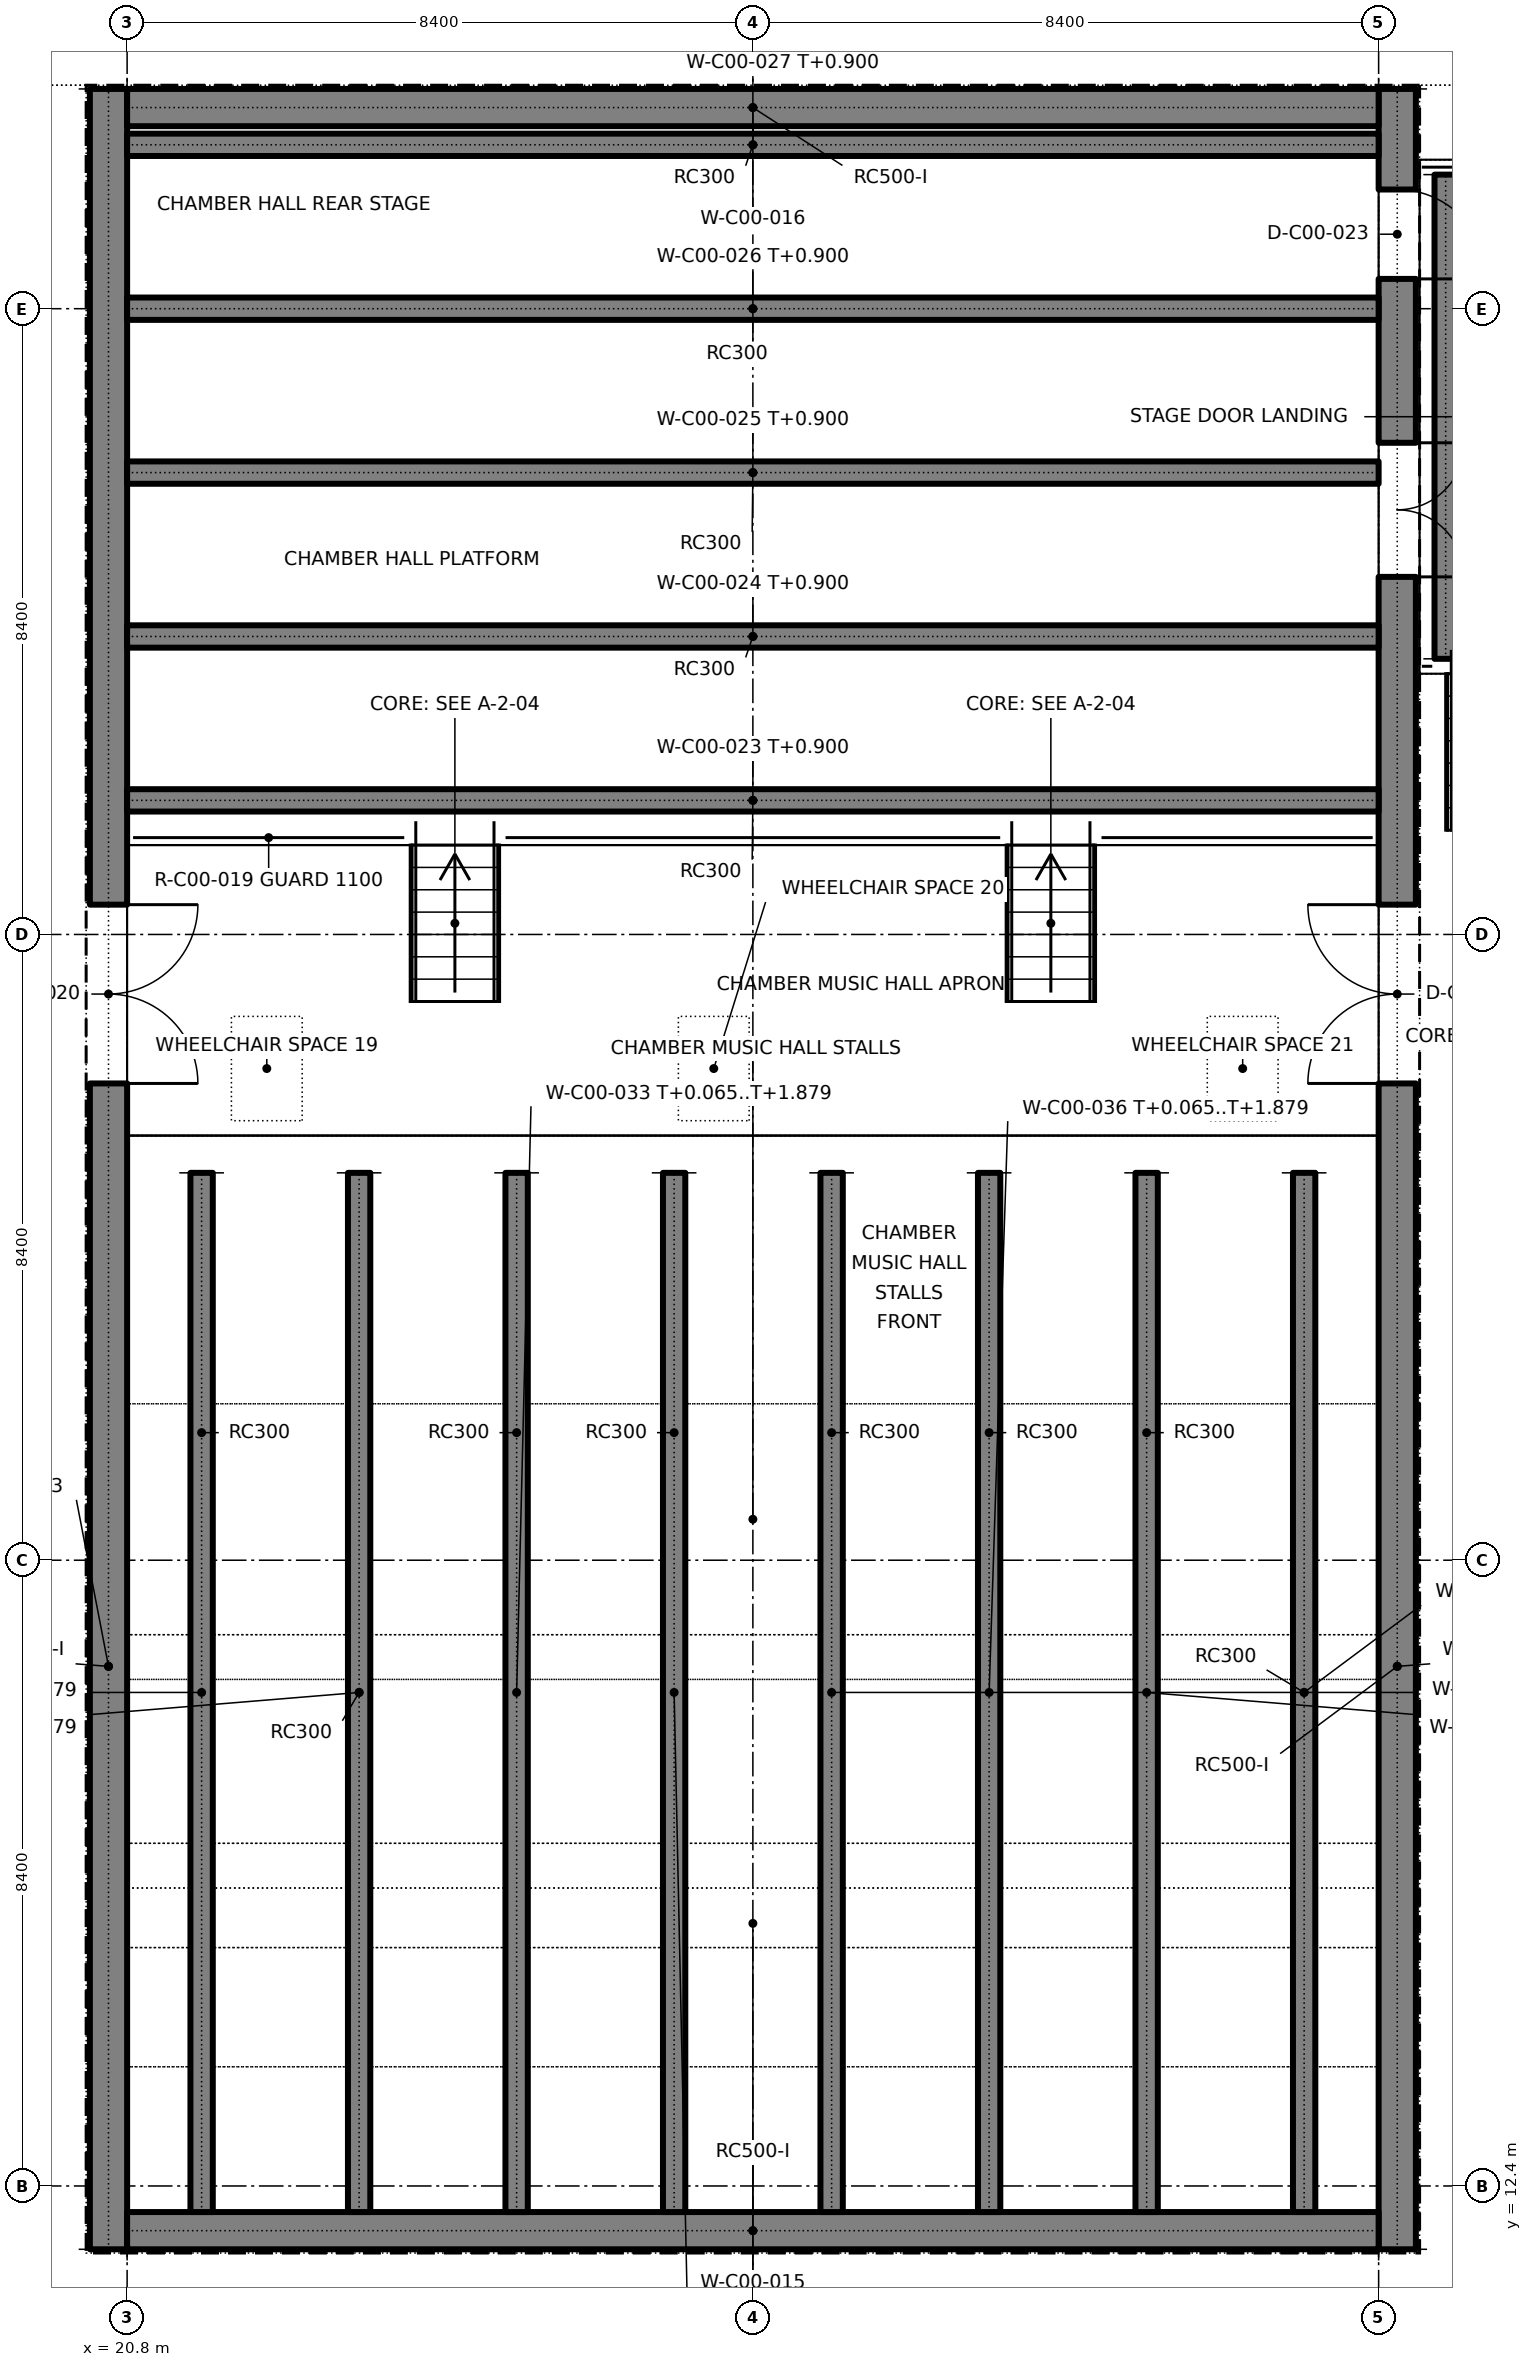
"""IFC4 building model, lengths in metres.
Left out: names, types, materials, properties, quantities, classifications, styles, units other than length and angle.
Written with IfcOpenShell. Run it as: python <this file> out.ifc"""

import sys

from ifc_helpers import new_model, si_unit, direction, frame, frame_2d, origin, place, context, subcontext, project, spatial, polyline, rectangle, outline, extrude, element, fill, save


model = new_model("IFC4")
c1 = context("Model", 3, precision=1e-05, world=origin(), true_north=direction((0.0, 1.0)))
c2 = subcontext(c1, "Body", "Model", "MODEL_VIEW")
j1 = project(units=[si_unit("LENGTHUNIT", "METRE"), si_unit("PLANEANGLEUNIT", "RADIAN")], contexts=[c1])
p1 = place(None, origin())
s1 = spatial("IfcSite", under=j1, at=p1, CompositionType="ELEMENT")
p2 = place(p1, origin())
s2 = spatial("IfcBuilding", under=s1, at=p2, CompositionType="ELEMENT")
p3 = place(p2, origin())
s3 = spatial("IfcBuildingStorey", under=s2, at=p3, CompositionType="ELEMENT", Elevation=0.0)
p4 = place(p3, frame((20.55, 11.55, 0.0), z_axis=(0.0, 0.0, 1.0), x_axis=(0.0, 1.0, 0.0)))
e1 = element("IfcWall", 1, at=p4, inside=s3, PredefinedType="SOLIDWALL", context=c2, shape_type="SweptSolid", body=[
    extrude(rectangle(XDim=29.0, YDim=0.5, at=frame_2d((14.5, 0.0))), origin(), (0.0, 0.0, 1.0), 5.4),
])
p5 = place(p4, frame((15.65, 0.0, 0.0)))
e2 = element("IfcOpeningElement", 2, at=p5, cuts=e1, PredefinedType="OPENING", context=c2, shape_type="SweptSolid", body=[
    extrude(rectangle(XDim=2.4, YDim=2.1, at=frame_2d((1.2, 1.05))), frame((0.0, 0.26, 0.0), z_axis=(0.0, -1.0, 0.0), x_axis=(1.0, 0.0, 0.0)), (0.0, 0.0, 1.0), 0.52),
])
p6 = place(p3, frame((37.85, 11.55, 0.0), z_axis=(0.0, 0.0, 1.0), x_axis=(0.0, 1.0, 0.0)))
e3 = element("IfcWall", 3, at=p6, inside=s3, PredefinedType="SOLIDWALL", context=c2, shape_type="SweptSolid", body=[
    extrude(rectangle(XDim=29.0, YDim=0.5, at=frame_2d((14.5, 0.0))), origin(), (0.0, 0.0, 1.0), 5.4),
])
p7 = place(p6, frame((15.65, 0.0, 0.0)))
e4 = element("IfcOpeningElement", 4, at=p7, cuts=e3, PredefinedType="OPENING", context=c2, shape_type="SweptSolid", body=[
    extrude(rectangle(XDim=2.4, YDim=2.1, at=frame_2d((1.2, 1.05))), frame((0.0, 0.26, 0.0), z_axis=(0.0, -1.0, 0.0), x_axis=(1.0, 0.0, 0.0)), (0.0, 0.0, 1.0), 0.52),
])
p8 = place(p6, frame((22.45, 0.0, 1.2)))
e5 = element("IfcOpeningElement", 5, at=p8, cuts=e3, PredefinedType="OPENING", context=c2, shape_type="SweptSolid", body=[
    extrude(rectangle(XDim=1.8, YDim=2.1, at=frame_2d((0.9, 1.05))), frame((0.0, 0.26, 0.0), z_axis=(0.0, -1.0, 0.0), x_axis=(1.0, 0.0, 0.0)), (0.0, 0.0, 1.0), 0.52),
])
p9 = place(p6, frame((26.45, 0.0, 1.2)))
e6 = element("IfcOpeningElement", 6, at=p9, cuts=e3, PredefinedType="OPENING", context=c2, shape_type="SweptSolid", body=[
    extrude(rectangle(XDim=1.2, YDim=2.1, at=frame_2d((0.6, 1.05))), frame((0.0, 0.26, 0.0), z_axis=(0.0, -1.0, 0.0), x_axis=(1.0, 0.0, 0.0)), (0.0, 0.0, 1.0), 0.52),
])
for number, where, z_axis, x_axis in (
    (7, (20.8, 11.8, 0.0), (0.0, 0.0, 1.0), (1.0, 0.0, 0.0)),
    (8, (20.8, 40.3, 0.0), (0.0, 0.0, 1.0), (1.0, 0.0, 0.0)),
):
    element("IfcWall", number, at=place(p3, frame(where, z_axis=z_axis, x_axis=x_axis)), inside=s3, PredefinedType="SOLIDWALL", context=c2, shape_type="SweptSolid", body=[
        extrude(rectangle(XDim=16.8, YDim=0.5, at=frame_2d((8.4, 0.0))), origin(), (0.0, 0.0, 1.0), 5.4),
    ])
for number, where, z_axis, x_axis in (
    (9, (20.8, 31.0, 0.0), (0.0, 0.0, 1.0), (1.0, 0.0, 0.0)),
    (10, (20.8, 33.2, 0.0), (0.0, 0.0, 1.0), (1.0, 0.0, 0.0)),
    (11, (20.8, 35.4, 0.0), (0.0, 0.0, 1.0), (1.0, 0.0, 0.0)),
    (12, (20.8, 37.6, 0.0), (0.0, 0.0, 1.0), (1.0, 0.0, 0.0)),
    (13, (20.8, 39.8, 0.0), (0.0, 0.0, 1.0), (1.0, 0.0, 0.0)),
):
    element("IfcWall", number, at=place(p3, frame(where, z_axis=z_axis, x_axis=x_axis)), inside=s3, PredefinedType="SOLIDWALL", context=c2, shape_type="SweptSolid", body=[
        extrude(rectangle(XDim=16.8, YDim=0.3, at=frame_2d((8.4, 0.0))), origin(), (0.0, 0.0, 1.0), 0.9),
    ])
p10 = place(p3, frame((38.5, 32.9, 0.0), z_axis=(0.0, 0.0, 1.0), x_axis=(0.0, 1.0, 0.0)))
e14 = element("IfcWall", 14, at=p10, inside=s3, PredefinedType="SOLIDWALL", context=c2, shape_type="SweptSolid", body=[
    extrude(rectangle(XDim=6.5, YDim=0.3, at=frame_2d((3.25, 0.0))), origin(), (0.0, 0.0, 1.0), 0.9),
])
for number, where, z_axis, x_axis in (
    (15, (21.8, 12.05, 0.0), (0.0, 0.0, 1.0), (0.0, 1.0, 0.0)),
    (16, (23.914, 12.05, 0.0), (0.0, 0.0, 1.0), (0.0, 1.0, 0.0)),
    (17, (26.029, 12.05, 0.0), (0.0, 0.0, 1.0), (0.0, 1.0, 0.0)),
    (18, (28.143, 12.05, 0.0), (0.0, 0.0, 1.0), (0.0, 1.0, 0.0)),
    (19, (30.257, 12.05, 0.0), (0.0, 0.0, 1.0), (0.0, 1.0, 0.0)),
    (20, (32.371, 12.05, 0.0), (0.0, 0.0, 1.0), (0.0, 1.0, 0.0)),
    (21, (34.486, 12.05, 0.0), (0.0, 0.0, 1.0), (0.0, 1.0, 0.0)),
    (22, (36.6, 12.05, 0.0), (0.0, 0.0, 1.0), (0.0, 1.0, 0.0)),
):
    element("IfcWall", number, at=place(p3, frame(where, z_axis=z_axis, x_axis=x_axis)), inside=s3, PredefinedType="SOLIDWALL", context=c2, shape_type="SweptSolid", body=[
        extrude(outline(polyline([(0.0, 0.0), (13.95, 0.0), (13.95, 0.065), (0.0, 1.878), (0.0, 0.0)])), frame((0.0, 0.15, 0.0), z_axis=(0.0, -1.0, 0.0), x_axis=(1.0, 0.0, 0.0)), (0.0, 0.0, 1.0), 0.3),
    ])
for number, where, z_axis, x_axis in (
    (23, (20.55, 11.57, -0.41), (0.0, 0.0, 1.0), (0.0, 1.0, 0.0)),
    (24, (37.85, 11.57, -0.41), (0.0, 0.0, 1.0), (0.0, 1.0, 0.0)),
):
    element("IfcWall", number, at=place(p3, frame(where, z_axis=z_axis, x_axis=x_axis)), inside=s3, PredefinedType="SOLIDWALL", context=c2, shape_type="SweptSolid", body=[
        extrude(rectangle(XDim=28.96, YDim=0.5, at=frame_2d((14.48, 0.0))), origin(), (0.0, 0.0, 1.0), 0.41),
    ])
p11 = place(p3, frame((20.8, 11.8, -0.41), z_axis=(0.0, 0.0, 1.0), x_axis=(1.0, 0.0, 0.0)))
e25 = element("IfcWall", 25, at=p11, inside=s3, PredefinedType="SOLIDWALL", context=c2, shape_type="SweptSolid", body=[
    extrude(rectangle(XDim=16.8, YDim=0.5, at=frame_2d((8.4, 0.0))), origin(), (0.0, 0.0, 1.0), 0.41),
])
p12 = place(p3, frame((20.8, 40.3, -0.3), z_axis=(0.0, 0.0, 1.0), x_axis=(1.0, 0.0, 0.0)))
e26 = element("IfcWall", 26, at=p12, inside=s3, PredefinedType="SOLIDWALL", context=c2, shape_type="SweptSolid", body=[
    extrude(rectangle(XDim=16.8, YDim=0.5, at=frame_2d((8.4, 0.0))), origin(), (0.0, 0.0, 1.0), 0.3),
])
p13 = place(p3, frame((20.8, 31.0, -0.41), z_axis=(0.0, 0.0, 1.0), x_axis=(1.0, 0.0, 0.0)))
e27 = element("IfcWall", 27, at=p13, inside=s3, PredefinedType="SOLIDWALL", context=c2, shape_type="SweptSolid", body=[
    extrude(rectangle(XDim=16.8, YDim=0.3, at=frame_2d((8.4, 0.0))), origin(), (0.0, 0.0, 1.0), 0.41),
])
for number, where, z_axis, x_axis in (
    (28, (20.8, 33.2, -0.3), (0.0, 0.0, 1.0), (1.0, 0.0, 0.0)),
    (29, (20.8, 35.4, -0.3), (0.0, 0.0, 1.0), (1.0, 0.0, 0.0)),
    (30, (20.8, 37.6, -0.3), (0.0, 0.0, 1.0), (1.0, 0.0, 0.0)),
    (31, (20.8, 39.8, -0.3), (0.0, 0.0, 1.0), (1.0, 0.0, 0.0)),
):
    element("IfcWall", number, at=place(p3, frame(where, z_axis=z_axis, x_axis=x_axis)), inside=s3, PredefinedType="SOLIDWALL", context=c2, shape_type="SweptSolid", body=[
        extrude(rectangle(XDim=16.8, YDim=0.3, at=frame_2d((8.4, 0.0))), origin(), (0.0, 0.0, 1.0), 0.3),
    ])
for number, where, z_axis, x_axis in (
    (32, (21.8, 12.05, -0.3), (0.0, 0.0, 1.0), (0.0, 1.0, 0.0)),
    (33, (23.914, 12.05, -0.3), (0.0, 0.0, 1.0), (0.0, 1.0, 0.0)),
    (34, (26.029, 12.05, -0.3), (0.0, 0.0, 1.0), (0.0, 1.0, 0.0)),
    (35, (28.143, 12.05, -0.3), (0.0, 0.0, 1.0), (0.0, 1.0, 0.0)),
    (36, (30.257, 12.05, -0.3), (0.0, 0.0, 1.0), (0.0, 1.0, 0.0)),
    (37, (32.371, 12.05, -0.3), (0.0, 0.0, 1.0), (0.0, 1.0, 0.0)),
    (38, (34.486, 12.05, -0.3), (0.0, 0.0, 1.0), (0.0, 1.0, 0.0)),
    (39, (36.6, 12.05, -0.3), (0.0, 0.0, 1.0), (0.0, 1.0, 0.0)),
):
    element("IfcWall", number, at=place(p3, frame(where, z_axis=z_axis, x_axis=x_axis)), inside=s3, PredefinedType="SOLIDWALL", context=c2, shape_type="SweptSolid", body=[
        extrude(rectangle(XDim=13.93, YDim=0.3, at=frame_2d((6.965, 0.0))), origin(), (0.0, 0.0, 1.0), 0.3),
    ])
p14 = place(p5, frame((2.4, 0.0, 0.0), z_axis=(0.0, 0.0, 1.0), x_axis=(-1.0, 0.0, 0.0)))
e40 = element("IfcDoor", 40, at=p14, inside=s3, OperationType="DOUBLE_DOOR_SINGLE_SWING", PredefinedType="DOOR", context=c2, shape_type="SweptSolid", body=[
    extrude(rectangle(XDim=2.4, YDim=2.1, at=frame_2d((1.2, 1.05))), frame((0.0, 0.025, 0.0), z_axis=(0.0, -1.0, 0.0), x_axis=(1.0, 0.0, 0.0)), (0.0, 0.0, 1.0), 0.05),
])
fill(e2, e40)
p15 = place(p7, origin())
e41 = element("IfcDoor", 41, at=p15, inside=s3, OperationType="DOUBLE_DOOR_SINGLE_SWING", PredefinedType="DOOR", context=c2, shape_type="SweptSolid", body=[
    extrude(rectangle(XDim=2.4, YDim=2.1, at=frame_2d((1.2, 1.05))), frame((0.0, 0.025, 0.0), z_axis=(0.0, -1.0, 0.0), x_axis=(1.0, 0.0, 0.0)), (0.0, 0.0, 1.0), 0.05),
])
fill(e4, e41)
p16 = place(p8, frame((1.8, 0.0, 0.0), z_axis=(0.0, 0.0, 1.0), x_axis=(-1.0, 0.0, 0.0)))
e42 = element("IfcDoor", 42, at=p16, inside=s3, OperationType="DOUBLE_DOOR_SINGLE_SWING", PredefinedType="DOOR", context=c2, shape_type="SweptSolid", body=[
    extrude(rectangle(XDim=1.8, YDim=2.1, at=frame_2d((0.9, 1.05))), frame((0.0, 0.025, 0.0), z_axis=(0.0, -1.0, 0.0), x_axis=(1.0, 0.0, 0.0)), (0.0, 0.0, 1.0), 0.05),
])
fill(e5, e42)
p17 = place(p9, frame((1.2, 0.0, 0.0), z_axis=(0.0, 0.0, 1.0), x_axis=(-1.0, 0.0, 0.0)))
e43 = element("IfcDoor", 43, at=p17, inside=s3, OperationType="SINGLE_SWING_RIGHT", PredefinedType="DOOR", context=c2, shape_type="SweptSolid", body=[
    extrude(rectangle(XDim=1.2, YDim=2.1, at=frame_2d((0.6, 1.05))), frame((0.0, 0.025, 0.0), z_axis=(0.0, -1.0, 0.0), x_axis=(1.0, 0.0, 0.0)), (0.0, 0.0, 1.0), 0.05),
])
fill(e6, e43)
save(model, sys.argv[1])
